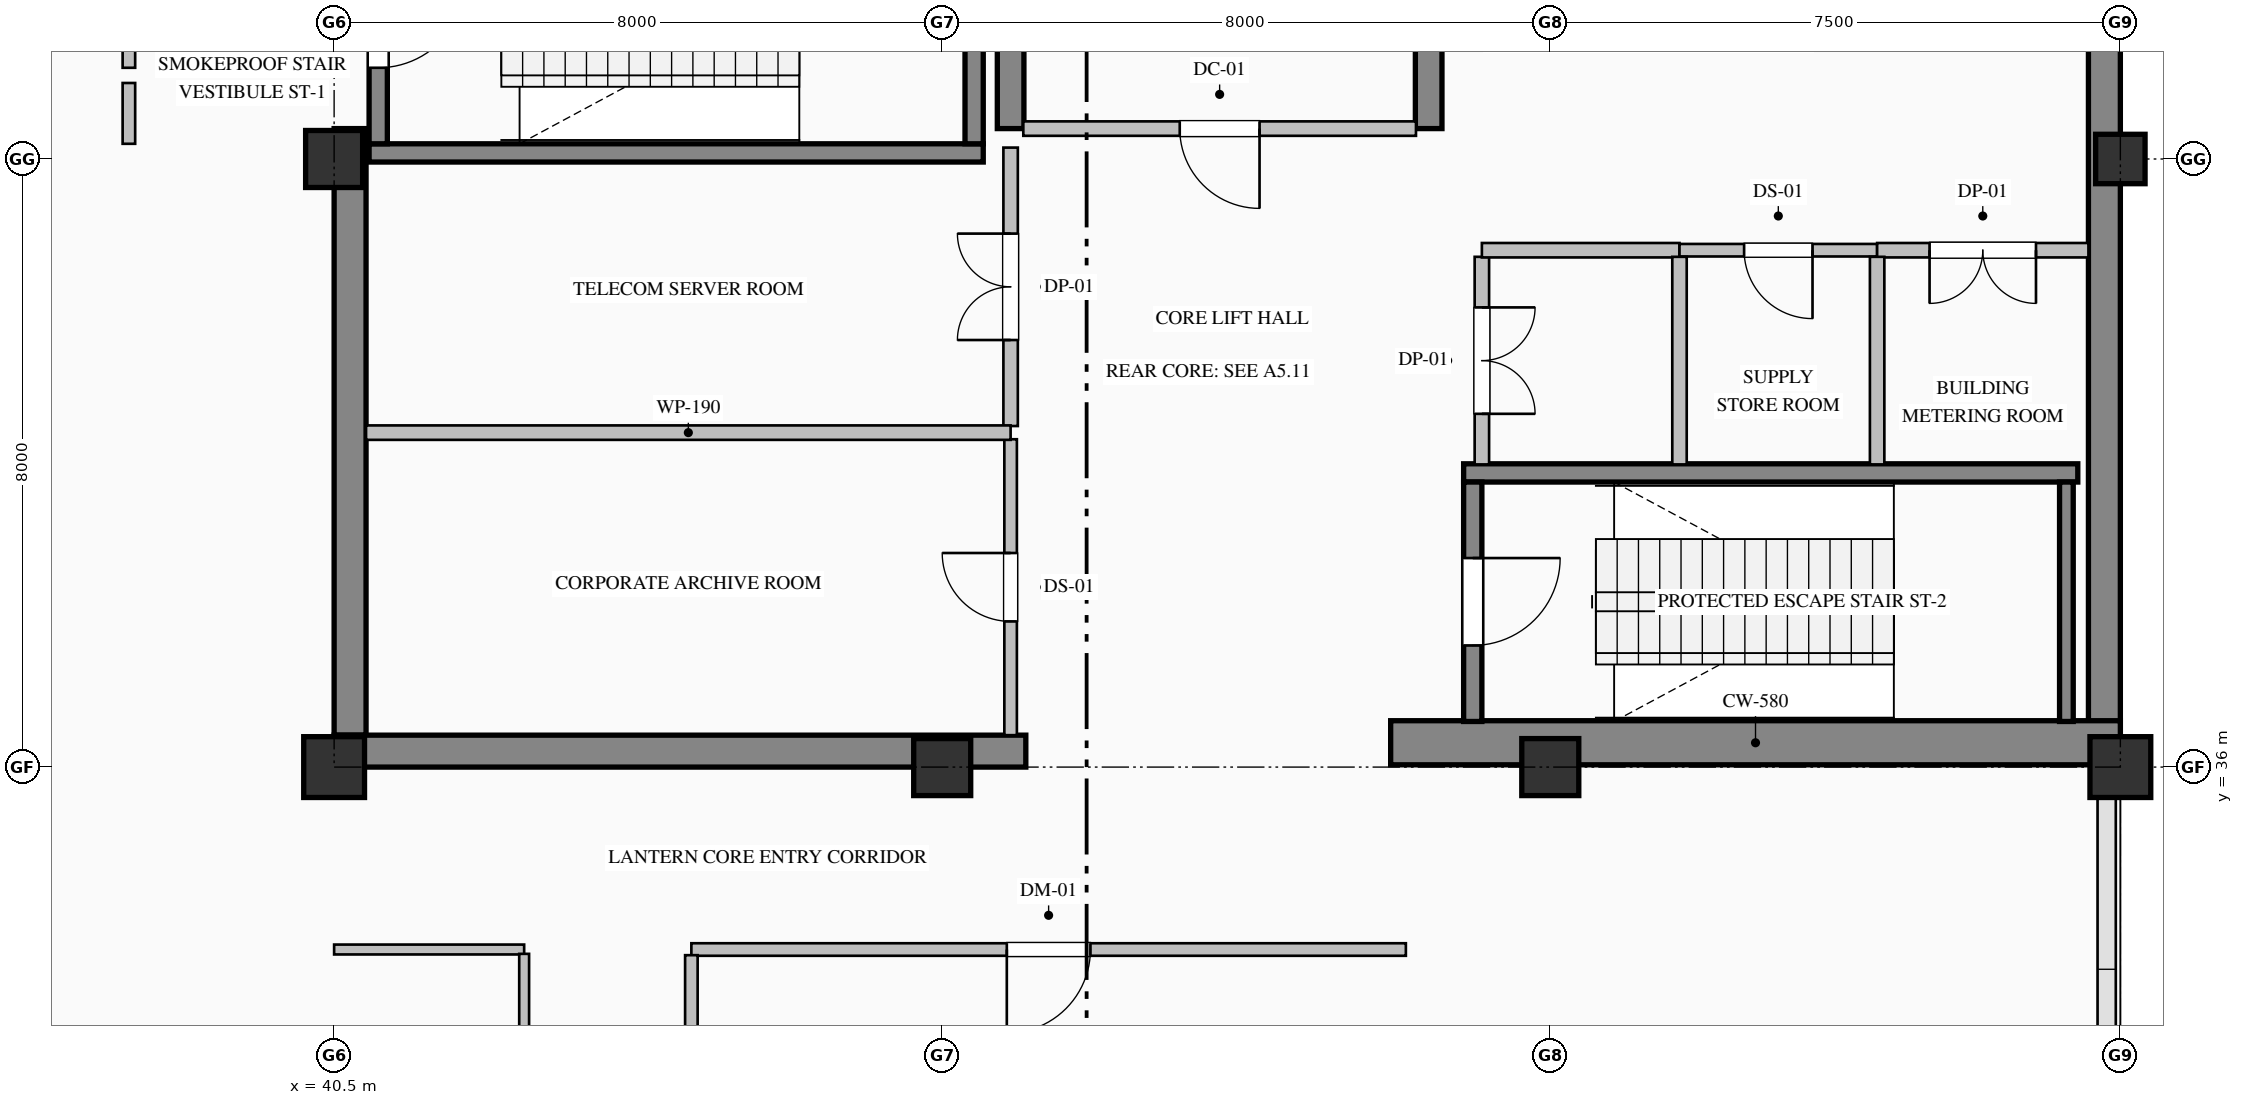
"""IFC4 building model, lengths in metres.
Left out: names, types, materials, properties, quantities, classifications, styles, units other than length and angle.
Written with IfcOpenShell. Run it as: python <this file> out.ifc"""

import sys

from ifc_helpers import new_model, si_unit, direction, frame, frame_2d, origin, origin_2d, place, context, subcontext, project, spatial, rectangle, hollow_rectangle, extrude, element, fill, save


model = new_model("IFC4")
c1 = context("Model", 3, precision=1e-05, world=origin(), true_north=direction((0.0, 1.0)))
c2 = subcontext(c1, "Body", "Model", "MODEL_VIEW")
j1 = project(units=[si_unit("LENGTHUNIT", "METRE"), si_unit("PLANEANGLEUNIT", "RADIAN")], contexts=[c1])
p1 = place(None, origin())
s1 = spatial("IfcSite", under=j1, at=p1, CompositionType="ELEMENT")
p2 = place(p1, origin())
s2 = spatial("IfcBuilding", under=s1, at=p2, CompositionType="ELEMENT")
p3 = place(p2, frame((0.0, 0.0, 373.0)))
s3 = spatial("IfcBuildingStorey", under=s2, at=p3, CompositionType="ELEMENT", Elevation=373.0)
p4 = place(p3, frame((63.79, 36.32, 0.0), z_axis=(0.0, 0.0, 1.0), x_axis=(0.0, 1.0, 0.0)))
e1 = element("IfcWall", 1, at=p4, inside=s3, PredefinedType="SHEAR", context=c2, shape_type="SweptSolid", body=[
    extrude(rectangle(XDim=15.26, YDim=0.42, at=frame_2d((7.63, 0.0))), origin(), (0.0, 0.0, 1.0), 5.11),
])
p5 = place(p3, frame((40.71, 36.42, 0.0), z_axis=(0.0, 0.0, 1.0), x_axis=(0.0, 1.0, 0.0)))
e2 = element("IfcWall", 2, at=p5, inside=s3, PredefinedType="SHEAR", context=c2, shape_type="SweptSolid", body=[
    extrude(rectangle(XDim=7.98, YDim=0.42, at=frame_2d((3.99, 0.0))), origin(), (0.0, 0.0, 1.0), 5.11),
])
p6 = place(p3, frame((40.5, 36.21, 0.0), z_axis=(0.0, 0.0, 1.0), x_axis=(1.0, 0.0, 0.0)))
e3 = element("IfcWall", 3, at=p6, inside=s3, PredefinedType="SHEAR", context=c2, shape_type="SweptSolid", body=[
    extrude(rectangle(XDim=9.1, YDim=0.42, at=frame_2d((4.55, 0.0))), origin(), (0.0, 0.0, 1.0), 5.11),
])
p7 = place(p3, frame((54.4, 36.32, 0.0), z_axis=(0.0, 0.0, 1.0), x_axis=(1.0, 0.0, 0.0)))
e4 = element("IfcWall", 4, at=p7, inside=s3, PredefinedType="SHEAR", context=c2, shape_type="SweptSolid", body=[
    extrude(rectangle(XDim=9.6, YDim=0.58, at=frame_2d((4.8, 0.0))), origin(), (0.0, 0.0, 1.0), 5.4),
])
p8 = place(p3, frame((49.4, 44.4, 0.0), z_axis=(0.0, 0.0, 1.0), x_axis=(0.0, 1.0, 0.0)))
e5 = element("IfcWall", 5, at=p8, inside=s3, PredefinedType="SHEAR", context=c2, shape_type="SweptSolid", body=[
    extrude(rectangle(XDim=3.0, YDim=0.35, at=frame_2d((1.5, 0.0))), origin(), (0.0, 0.0, 1.0), 5.11),
])
p9 = place(p3, frame((54.9, 44.4, 0.0), z_axis=(0.0, 0.0, 1.0), x_axis=(0.0, 1.0, 0.0)))
e6 = element("IfcWall", 6, at=p9, inside=s3, PredefinedType="SHEAR", context=c2, shape_type="SweptSolid", body=[
    extrude(rectangle(XDim=7.18, YDim=0.35, at=frame_2d((3.59, 0.0))), origin(), (0.0, 0.0, 1.0), 5.11),
])
p10 = place(p3, frame((40.5, 36.0, 0.0), z_axis=(0.0, 0.0, 1.0), x_axis=(1.0, 0.0, 0.0)))
e7 = element("IfcColumn", 7, at=p10, inside=s3, PredefinedType="COLUMN", context=c2, shape_type="SweptSolid", body=[
    extrude(hollow_rectangle(XDim=0.8, YDim=0.8, WallThickness=0.032, at=origin_2d()), origin(), (0.0, 0.0, 1.0), 5.4),
])
for number, where, z_axis, x_axis in (
    (8, (40.5, 44.0, 0.0), (0.0, 0.0, 1.0), (1.0, 0.0, 0.0)),
    (9, (48.5, 36.0, 0.0), (0.0, 0.0, 1.0), (1.0, 0.0, 0.0)),
    (10, (56.5, 36.0, 0.0), (0.0, 0.0, 1.0), (1.0, 0.0, 0.0)),
):
    element("IfcColumn", number, at=place(p3, frame(where, z_axis=z_axis, x_axis=x_axis)), inside=s3, PredefinedType="COLUMN", context=c2, shape_type="SweptSolid", body=[
        extrude(rectangle(XDim=0.75, YDim=0.75, at=origin_2d()), origin(), (0.0, 0.0, 1.0), 5.4),
    ])
p11 = place(p3, frame((64.0, 36.0, 0.0), z_axis=(0.0, 0.0, 1.0), x_axis=(1.0, 0.0, 0.0)))
e11 = element("IfcColumn", 11, at=p11, inside=s3, PredefinedType="COLUMN", context=c2, shape_type="SweptSolid", body=[
    extrude(hollow_rectangle(XDim=0.8, YDim=0.8, WallThickness=0.032, at=origin_2d()), origin(), (0.0, 0.0, 1.0), 5.4),
])
p12 = place(p3, frame((64.0, 44.0, 0.0), z_axis=(0.0, 0.0, 1.0), x_axis=(1.0, 0.0, 0.0)))
e12 = element("IfcColumn", 12, at=p12, inside=s3, PredefinedType="COLUMN", context=c2, shape_type="SweptSolid", body=[
    extrude(hollow_rectangle(XDim=0.65, YDim=0.65, WallThickness=0.028, at=origin_2d()), origin(), (0.0, 0.0, 1.0), 5.4),
])
p13 = place(p3, frame((49.04, 44.08, 0.0), z_axis=(0.0, 0.0, 1.0), x_axis=(-1.0, 0.0, 0.0)))
e13 = element("IfcWall", 13, at=p13, inside=s3, PredefinedType="SOLIDWALL", context=c2, shape_type="SweptSolid", body=[
    extrude(rectangle(XDim=8.08, YDim=0.24, at=frame_2d((4.04, 0.0))), origin(), (0.0, 0.0, 1.0), 5.4),
])
p14 = place(p3, frame((41.08, 47.35, 0.0), z_axis=(0.0, 0.0, 1.0), x_axis=(0.0, -1.0, 0.0)))
e14 = element("IfcWall", 14, at=p14, inside=s3, PredefinedType="SOLIDWALL", context=c2, shape_type="SweptSolid", body=[
    extrude(rectangle(XDim=3.15, YDim=0.24, at=frame_2d((1.575, 0.0))), origin(), (0.0, 0.0, 1.0), 5.4),
])
p15 = place(p14, frame((1.0, 0.0, 0.0)))
e15 = element("IfcOpeningElement", 15, at=p15, cuts=e14, PredefinedType="OPENING", context=c2, shape_type="SweptSolid", body=[
    extrude(rectangle(XDim=1.15, YDim=2.2, at=frame_2d((0.575, 1.1))), frame((0.0, 0.13, 0.0), z_axis=(0.0, -1.0, 0.0), x_axis=(1.0, 0.0, 0.0)), (0.0, 0.0, 1.0), 0.26),
])
p16 = place(p3, frame((48.92, 44.2, 0.0), z_axis=(0.0, 0.0, 1.0), x_axis=(0.0, 1.0, 0.0)))
e16 = element("IfcWall", 16, at=p16, inside=s3, PredefinedType="SOLIDWALL", context=c2, shape_type="SweptSolid", body=[
    extrude(rectangle(XDim=3.15, YDim=0.24, at=frame_2d((1.575, 0.0))), origin(), (0.0, 0.0, 1.0), 5.4),
])
p17 = place(p3, frame((55.36, 39.87, 0.0), z_axis=(0.0, 0.0, 1.0), x_axis=(1.0, 0.0, 0.0)))
e17 = element("IfcWall", 17, at=p17, inside=s3, PredefinedType="SOLIDWALL", context=c2, shape_type="SweptSolid", body=[
    extrude(rectangle(XDim=8.08, YDim=0.24, at=frame_2d((4.04, 0.0))), origin(), (0.0, 0.0, 1.0), 5.4),
])
p18 = place(p3, frame((55.48, 39.75, 0.0), z_axis=(0.0, 0.0, 1.0), x_axis=(0.0, -1.0, 0.0)))
e18 = element("IfcWall", 18, at=p18, inside=s3, PredefinedType="SOLIDWALL", context=c2, shape_type="SweptSolid", body=[
    extrude(rectangle(XDim=3.15, YDim=0.24, at=frame_2d((1.575, 0.0))), origin(), (0.0, 0.0, 1.0), 5.4),
])
p19 = place(p18, frame((1.0, 0.0, 0.0)))
e19 = element("IfcOpeningElement", 19, at=p19, cuts=e18, PredefinedType="OPENING", context=c2, shape_type="SweptSolid", body=[
    extrude(rectangle(XDim=1.15, YDim=2.2, at=frame_2d((0.575, 1.1))), frame((0.0, 0.13, 0.0), z_axis=(0.0, -1.0, 0.0), x_axis=(1.0, 0.0, 0.0)), (0.0, 0.0, 1.0), 0.26),
])
p20 = place(p3, frame((63.29, 36.6, 0.0), z_axis=(0.0, 0.0, 1.0), x_axis=(0.0, 1.0, 0.0)))
e20 = element("IfcWall", 20, at=p20, inside=s3, PredefinedType="SOLIDWALL", context=c2, shape_type="SweptSolid", body=[
    extrude(rectangle(XDim=3.15, YDim=0.18, at=frame_2d((1.575, 0.0))), origin(), (0.0, 0.0, 1.0), 5.4),
])
p21 = place(p3, frame((37.8, 45.2, 0.0), z_axis=(0.0, 0.0, 1.0), x_axis=(0.0, 1.0, 0.0)))
e21 = element("IfcWall", 21, at=p21, inside=s3, PredefinedType="PARTITIONING", context=c2, shape_type="SweptSolid", body=[
    extrude(rectangle(XDim=2.125, YDim=0.165, at=frame_2d((1.063, 0.0))), origin(), (0.0, 0.0, 1.0), 5.11),
])
p22 = place(p21, frame((0.538, 0.0, 0.0)))
e22 = element("IfcOpeningElement", 22, at=p22, cuts=e21, PredefinedType="OPENING", context=c2, shape_type="SweptSolid", body=[
    extrude(rectangle(XDim=1.05, YDim=2.15, at=frame_2d((0.525, 1.075))), frame((0.0, 0.093, 0.0), z_axis=(0.0, -1.0, 0.0), x_axis=(1.0, 0.0, 0.0)), (0.0, 0.0, 1.0), 0.185),
])
p23 = place(p3, frame((37.8, 44.2, 0.0), z_axis=(0.0, 0.0, 1.0), x_axis=(0.0, 1.0, 0.0)))
e23 = element("IfcWall", 23, at=p23, inside=s3, PredefinedType="PARTITIONING", context=c2, shape_type="SweptSolid", body=[
    extrude(rectangle(XDim=0.8, YDim=0.165, at=frame_2d((0.4, 0.0))), origin(), (0.0, 0.0, 1.0), 5.11),
])
p24 = place(p3, frame((54.733, 44.4, 0.0), z_axis=(0.0, 0.0, 1.0), x_axis=(-1.0, 0.0, 0.0)))
e24 = element("IfcWall", 24, at=p24, inside=s3, PredefinedType="PARTITIONING", context=c2, shape_type="SweptSolid", body=[
    extrude(rectangle(XDim=5.166, YDim=0.19, at=frame_2d((2.583, 0.0))), origin(), (0.0, 0.0, 1.0), 5.11),
])
p25 = place(p24, frame((2.058, 0.0, 0.0)))
e25 = element("IfcOpeningElement", 25, at=p25, cuts=e24, PredefinedType="OPENING", context=c2, shape_type="SweptSolid", body=[
    extrude(rectangle(XDim=1.05, YDim=2.15, at=frame_2d((0.525, 1.075))), frame((0.0, 0.105, 0.0), z_axis=(0.0, -1.0, 0.0), x_axis=(1.0, 0.0, 0.0)), (0.0, 0.0, 1.0), 0.21),
])
p26 = place(p3, frame((49.4, 36.42, 0.0), z_axis=(0.0, 0.0, 1.0), x_axis=(0.0, 1.0, 0.0)))
e26 = element("IfcWall", 26, at=p26, inside=s3, PredefinedType="PARTITIONING", context=c2, shape_type="SweptSolid", body=[
    extrude(rectangle(XDim=3.893, YDim=0.165, at=frame_2d((1.947, 0.0))), origin(), (0.0, 0.0, 1.0), 4.352),
])
p27 = place(p26, frame((1.497, 0.0, 0.0)))
e27 = element("IfcOpeningElement", 27, at=p27, cuts=e26, PredefinedType="OPENING", context=c2, shape_type="SweptSolid", body=[
    extrude(rectangle(XDim=0.9, YDim=2.15, at=frame_2d((0.45, 1.075))), frame((0.0, 0.093, 0.0), z_axis=(0.0, -1.0, 0.0), x_axis=(1.0, 0.0, 0.0)), (0.0, 0.0, 1.0), 0.185),
])
p28 = place(p3, frame((49.4, 40.487, 0.0), z_axis=(0.0, 0.0, 1.0), x_axis=(0.0, 1.0, 0.0)))
e28 = element("IfcWall", 28, at=p28, inside=s3, PredefinedType="PARTITIONING", context=c2, shape_type="SweptSolid", body=[
    extrude(rectangle(XDim=3.663, YDim=0.19, at=frame_2d((1.832, 0.0))), origin(), (0.0, 0.0, 1.0), 4.352),
])
p29 = place(p28, frame((1.132, 0.0, 0.0)))
e29 = element("IfcOpeningElement", 29, at=p29, cuts=e28, PredefinedType="OPENING", context=c2, shape_type="SweptSolid", body=[
    extrude(rectangle(XDim=1.4, YDim=2.25, at=frame_2d((0.7, 1.125))), frame((0.0, 0.105, 0.0), z_axis=(0.0, -1.0, 0.0), x_axis=(1.0, 0.0, 0.0)), (0.0, 0.0, 1.0), 0.21),
])
p30 = place(p3, frame((55.6, 42.713, 0.0), z_axis=(0.0, 0.0, 1.0), x_axis=(0.0, -1.0, 0.0)))
e30 = element("IfcWall", 30, at=p30, inside=s3, PredefinedType="PARTITIONING", context=c2, shape_type="SweptSolid", body=[
    extrude(rectangle(XDim=2.731, YDim=0.19, at=frame_2d((1.365, 0.0))), origin(), (0.0, 0.0, 1.0), 5.11),
])
p31 = place(p30, frame((0.666, 0.0, 0.0)))
e31 = element("IfcOpeningElement", 31, at=p31, cuts=e30, PredefinedType="OPENING", context=c2, shape_type="SweptSolid", body=[
    extrude(rectangle(XDim=1.4, YDim=2.25, at=frame_2d((0.7, 1.125))), frame((0.0, 0.105, 0.0), z_axis=(0.0, -1.0, 0.0), x_axis=(1.0, 0.0, 0.0)), (0.0, 0.0, 1.0), 0.21),
])
p32 = place(p3, frame((40.92, 40.4, 0.0), z_axis=(0.0, 0.0, 1.0), x_axis=(1.0, 0.0, 0.0)))
e32 = element("IfcWall", 32, at=p32, inside=s3, PredefinedType="PARTITIONING", context=c2, shape_type="SweptSolid", body=[
    extrude(rectangle(XDim=8.48, YDim=0.19, at=frame_2d((4.24, 0.0))), origin(), (0.0, 0.0, 1.0), 5.11),
])
p33 = place(p3, frame((58.2, 42.8, 0.0), z_axis=(0.0, 0.0, 1.0), x_axis=(-1.0, 0.0, 0.0)))
e33 = element("IfcWall", 33, at=p33, inside=s3, PredefinedType="PARTITIONING", context=c2, shape_type="SweptSolid", body=[
    extrude(rectangle(XDim=2.6, YDim=0.19, at=frame_2d((1.3, 0.0))), origin(), (0.0, 0.0, 1.0), 5.11),
])
p34 = place(p3, frame((60.8, 42.8, 0.0), z_axis=(0.0, 0.0, 1.0), x_axis=(-1.0, 0.0, 0.0)))
e34 = element("IfcWall", 34, at=p34, inside=s3, PredefinedType="PARTITIONING", context=c2, shape_type="SweptSolid", body=[
    extrude(rectangle(XDim=2.6, YDim=0.165, at=frame_2d((1.3, 0.0))), origin(), (0.0, 0.0, 1.0), 5.11),
])
p35 = place(p34, frame((0.85, 0.0, 0.0)))
e35 = element("IfcOpeningElement", 35, at=p35, cuts=e34, PredefinedType="OPENING", context=c2, shape_type="SweptSolid", body=[
    extrude(rectangle(XDim=0.9, YDim=2.15, at=frame_2d((0.45, 1.075))), frame((0.0, 0.093, 0.0), z_axis=(0.0, -1.0, 0.0), x_axis=(1.0, 0.0, 0.0)), (0.0, 0.0, 1.0), 0.185),
])
p36 = place(p3, frame((63.58, 42.8, 0.0), z_axis=(0.0, 0.0, 1.0), x_axis=(-1.0, 0.0, 0.0)))
e36 = element("IfcWall", 36, at=p36, inside=s3, PredefinedType="PARTITIONING", context=c2, shape_type="SweptSolid", body=[
    extrude(rectangle(XDim=2.78, YDim=0.19, at=frame_2d((1.39, 0.0))), origin(), (0.0, 0.0, 1.0), 5.11),
])
p37 = place(p36, frame((0.69, 0.0, 0.0)))
e37 = element("IfcOpeningElement", 37, at=p37, cuts=e36, PredefinedType="OPENING", context=c2, shape_type="SweptSolid", body=[
    extrude(rectangle(XDim=1.4, YDim=2.25, at=frame_2d((0.7, 1.125))), frame((0.0, 0.105, 0.0), z_axis=(0.0, -1.0, 0.0), x_axis=(1.0, 0.0, 0.0)), (0.0, 0.0, 1.0), 0.21),
])
for number, where, z_axis, x_axis in (
    (38, (58.2, 42.713, 0.0), (0.0, 0.0, 1.0), (0.0, -1.0, 0.0)),
    (39, (60.8, 42.713, 0.0), (0.0, 0.0, 1.0), (0.0, -1.0, 0.0)),
):
    element("IfcWall", number, at=place(p3, frame(where, z_axis=z_axis, x_axis=x_axis)), inside=s3, PredefinedType="PARTITIONING", context=c2, shape_type="SweptSolid", body=[
        extrude(rectangle(XDim=2.731, YDim=0.19, at=frame_2d((1.365, 0.0))), origin(), (0.0, 0.0, 1.0), 5.11),
    ])
p38 = place(p3, frame((54.6, 33.6, 0.0), z_axis=(0.0, 0.0, 1.0), x_axis=(-1.0, 0.0, 0.0)))
e40 = element("IfcWall", 40, at=p38, inside=s3, PredefinedType="PARTITIONING", context=c2, shape_type="SweptSolid", body=[
    extrude(rectangle(XDim=9.4, YDim=0.165, at=frame_2d((4.7, 0.0))), origin(), (0.0, 0.0, 1.0), 5.11),
])
p39 = place(p38, frame((4.15, 0.0, 0.0)))
e41 = element("IfcOpeningElement", 41, at=p39, cuts=e40, PredefinedType="OPENING", context=c2, shape_type="SweptSolid", body=[
    extrude(rectangle(XDim=1.1, YDim=2.2, at=frame_2d((0.55, 1.1))), frame((0.0, 0.093, 0.0), z_axis=(0.0, -1.0, 0.0), x_axis=(1.0, 0.0, 0.0)), (0.0, 0.0, 1.0), 0.185),
])
p40 = place(p3, frame((43.0, 33.6, 0.0), z_axis=(0.0, 0.0, 1.0), x_axis=(-1.0, 0.0, 0.0)))
e42 = element("IfcWall", 42, at=p40, inside=s3, PredefinedType="PARTITIONING", context=c2, shape_type="SweptSolid", body=[
    extrude(rectangle(XDim=2.5, YDim=0.13, at=frame_2d((1.25, 0.0))), origin(), (0.0, 0.0, 1.0), 5.11),
])
p41 = place(p3, frame((45.2, 33.525, 0.0), z_axis=(0.0, 0.0, 1.0), x_axis=(0.0, -1.0, 0.0)))
e43 = element("IfcWall", 43, at=p41, inside=s3, PredefinedType="PARTITIONING", context=c2, shape_type="SweptSolid", body=[
    extrude(rectangle(XDim=5.461, YDim=0.165, at=frame_2d((2.73, 0.0))), origin(), (0.0, 0.0, 1.0), 5.11),
])
p42 = place(p3, frame((43.0, 20.498, 0.0), z_axis=(0.0, 0.0, 1.0), x_axis=(0.0, 1.0, 0.0)))
e44 = element("IfcWall", 44, at=p42, inside=s3, PredefinedType="PARTITIONING", context=c2, shape_type="SweptSolid", body=[
    extrude(rectangle(XDim=13.045, YDim=0.13, at=frame_2d((6.522, 0.0))), origin(), (0.0, 0.0, 1.0), 5.11),
])
p43 = place(p42, frame((6.023, 0.0, 0.0)))
e45 = element("IfcOpeningElement", 45, at=p43, cuts=e44, PredefinedType="OPENING", context=c2, shape_type="SweptSolid", body=[
    extrude(rectangle(XDim=1.0, YDim=2.15, at=frame_2d((0.5, 1.075))), frame((0.0, 0.075, 0.0), z_axis=(0.0, -1.0, 0.0), x_axis=(1.0, 0.0, 0.0)), (0.0, 0.0, 1.0), 0.15),
])
p44 = place(p15, origin())
e46 = element("IfcDoor", 46, at=p44, inside=s3, OperationType="SINGLE_SWING_LEFT", PredefinedType="DOOR", context=c2, shape_type="SweptSolid", body=[
    extrude(rectangle(XDim=1.15, YDim=2.2, at=frame_2d((0.575, 1.1))), frame((0.0, 0.025, 0.0), z_axis=(0.0, -1.0, 0.0), x_axis=(1.0, 0.0, 0.0)), (0.0, 0.0, 1.0), 0.05),
])
fill(e15, e46)
p45 = place(p19, origin())
e47 = element("IfcDoor", 47, at=p45, inside=s3, OperationType="SINGLE_SWING_LEFT", PredefinedType="DOOR", context=c2, shape_type="SweptSolid", body=[
    extrude(rectangle(XDim=1.15, YDim=2.2, at=frame_2d((0.575, 1.1))), frame((0.0, 0.025, 0.0), z_axis=(0.0, -1.0, 0.0), x_axis=(1.0, 0.0, 0.0)), (0.0, 0.0, 1.0), 0.05),
])
fill(e19, e47)
p46 = place(p25, origin())
e48 = element("IfcDoor", 48, at=p46, inside=s3, OperationType="SINGLE_SWING_LEFT", PredefinedType="DOOR", context=c2, shape_type="SweptSolid", body=[
    extrude(rectangle(XDim=1.05, YDim=2.15, at=frame_2d((0.525, 1.075))), frame((0.0, 0.025, 0.0), z_axis=(0.0, -1.0, 0.0), x_axis=(1.0, 0.0, 0.0)), (0.0, 0.0, 1.0), 0.05),
])
fill(e25, e48)
p47 = place(p27, origin())
e49 = element("IfcDoor", 49, at=p47, inside=s3, OperationType="SINGLE_SWING_RIGHT", PredefinedType="DOOR", context=c2, shape_type="SweptSolid", body=[
    extrude(rectangle(XDim=0.9, YDim=2.15, at=frame_2d((0.45, 1.075))), frame((0.0, 0.025, 0.0), z_axis=(0.0, -1.0, 0.0), x_axis=(1.0, 0.0, 0.0)), (0.0, 0.0, 1.0), 0.05),
])
fill(e27, e49)
p48 = place(p29, origin())
e50 = element("IfcDoor", 50, at=p48, inside=s3, OperationType="DOUBLE_DOOR_SINGLE_SWING", PredefinedType="DOOR", context=c2, shape_type="SweptSolid", body=[
    extrude(rectangle(XDim=1.4, YDim=2.25, at=frame_2d((0.7, 1.125))), frame((0.0, 0.025, 0.0), z_axis=(0.0, -1.0, 0.0), x_axis=(1.0, 0.0, 0.0)), (0.0, 0.0, 1.0), 0.05),
])
fill(e29, e50)
p49 = place(p31, origin())
e51 = element("IfcDoor", 51, at=p49, inside=s3, OperationType="DOUBLE_DOOR_SINGLE_SWING", PredefinedType="DOOR", context=c2, shape_type="SweptSolid", body=[
    extrude(rectangle(XDim=1.4, YDim=2.25, at=frame_2d((0.7, 1.125))), frame((0.0, 0.025, 0.0), z_axis=(0.0, -1.0, 0.0), x_axis=(1.0, 0.0, 0.0)), (0.0, 0.0, 1.0), 0.05),
])
fill(e31, e51)
p50 = place(p35, origin())
e52 = element("IfcDoor", 52, at=p50, inside=s3, OperationType="SINGLE_SWING_LEFT", PredefinedType="DOOR", context=c2, shape_type="SweptSolid", body=[
    extrude(rectangle(XDim=0.9, YDim=2.15, at=frame_2d((0.45, 1.075))), frame((0.0, 0.025, 0.0), z_axis=(0.0, -1.0, 0.0), x_axis=(1.0, 0.0, 0.0)), (0.0, 0.0, 1.0), 0.05),
])
fill(e35, e52)
p51 = place(p37, origin())
e53 = element("IfcDoor", 53, at=p51, inside=s3, OperationType="DOUBLE_DOOR_SINGLE_SWING", PredefinedType="DOOR", context=c2, shape_type="SweptSolid", body=[
    extrude(rectangle(XDim=1.4, YDim=2.25, at=frame_2d((0.7, 1.125))), frame((0.0, 0.025, 0.0), z_axis=(0.0, -1.0, 0.0), x_axis=(1.0, 0.0, 0.0)), (0.0, 0.0, 1.0), 0.05),
])
fill(e37, e53)
p52 = place(p39, origin())
e54 = element("IfcDoor", 54, at=p52, inside=s3, OperationType="SINGLE_SWING_RIGHT", PredefinedType="DOOR", context=c2, shape_type="SweptSolid", body=[
    extrude(rectangle(XDim=1.1, YDim=2.2, at=frame_2d((0.55, 1.1))), frame((0.0, 0.025, 0.0), z_axis=(0.0, -1.0, 0.0), x_axis=(1.0, 0.0, 0.0)), (0.0, 0.0, 1.0), 0.05),
])
fill(e41, e54)
save(model, sys.argv[1])
